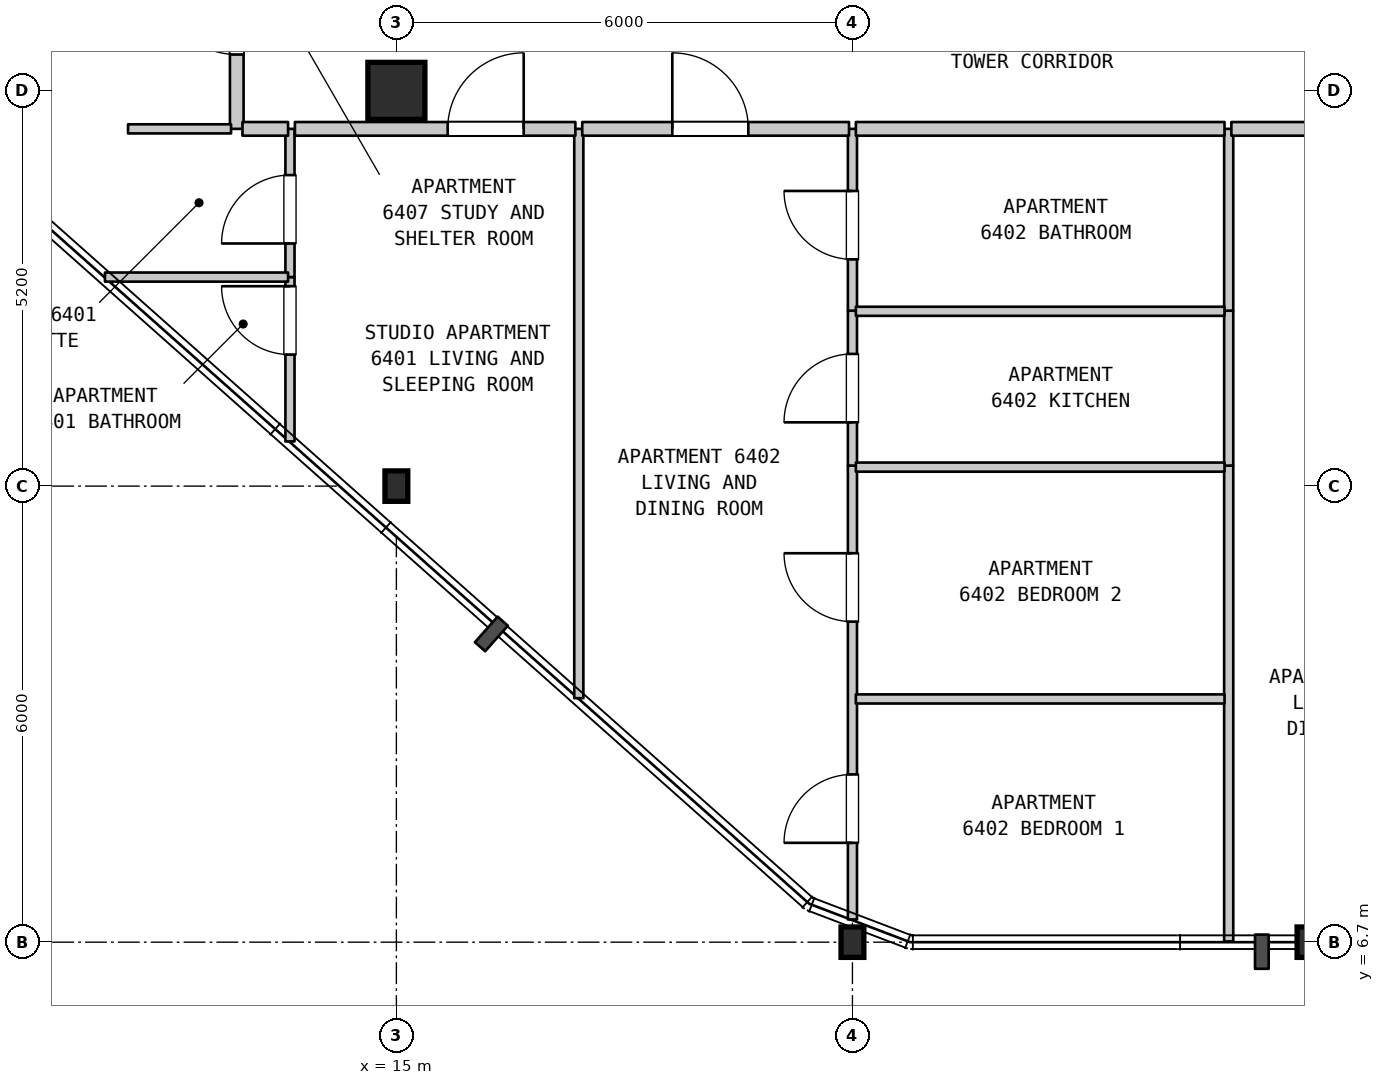
"""IFC4 building model, lengths in metres.
Left out: names, types, materials, properties, quantities, classifications, styles, units other than length and angle.
Written with IfcOpenShell. Run it as: python <this file> out.ifc"""

import sys

from ifc_helpers import new_model, si_unit, direction, frame, frame_2d, origin, origin_2d, place, context, subcontext, project, spatial, rectangle, i_section, extrude, element, fill, save


model = new_model("IFC4")
c1 = context("Model", 3, precision=1e-05, world=origin(), true_north=direction((0.0, 1.0)))
c2 = subcontext(c1, "Body", "Model", "MODEL_VIEW")
j1 = project(units=[si_unit("LENGTHUNIT", "METRE"), si_unit("PLANEANGLEUNIT", "RADIAN")], contexts=[c1])
p1 = place(None, origin())
s1 = spatial("IfcSite", under=j1, at=p1, CompositionType="ELEMENT")
p2 = place(p1, origin())
s2 = spatial("IfcBuilding", under=s1, at=p2, CompositionType="ELEMENT")
p3 = place(p2, frame((0.0, 0.0, 258.4)))
s3 = spatial("IfcBuildingStorey", under=s2, at=p3, CompositionType="ELEMENT", Elevation=258.4)
p4 = place(p3, frame((15.0, 12.7, 0.0), z_axis=(0.0, 0.0, 1.0), x_axis=(1.0, 0.0, 0.0)))
e1 = element("IfcColumn", 1, at=p4, inside=s3, PredefinedType="COLUMN", context=c2, shape_type="SweptSolid", body=[
    extrude(i_section(OverallWidth=0.3, OverallDepth=0.4, WebThickness=0.013, FlangeThickness=0.024, FilletRadius=0.027, at=origin_2d()), origin(), (0.0, 0.0, 1.0), 3.7),
])
p5 = place(p3, frame((15.0, 17.9, 0.0), z_axis=(0.0, 0.0, 1.0), x_axis=(1.0, 0.0, 0.0)))
e2 = element("IfcColumn", 2, at=p5, inside=s3, PredefinedType="COLUMN", context=c2, shape_type="SweptSolid", body=[
    extrude(rectangle(XDim=0.75, YDim=0.75, at=origin_2d()), origin(), (0.0, 0.0, 1.0), 3.7),
])
for number, where, z_axis, x_axis in (
    (3, (21.0, 6.7, 0.0), (0.0, 0.0, 1.0), (1.0, 0.0, 0.0)),
    (4, (27.0, 6.7, 0.0), (0.0, 0.0, 1.0), (1.0, 0.0, 0.0)),
):
    element("IfcColumn", number, at=place(p3, frame(where, z_axis=z_axis, x_axis=x_axis)), inside=s3, PredefinedType="COLUMN", context=c2, shape_type="SweptSolid", body=[
        extrude(i_section(OverallWidth=0.3, OverallDepth=0.4, WebThickness=0.013, FlangeThickness=0.024, FilletRadius=0.027, at=origin_2d()), origin(), (0.0, 0.0, 1.0), 3.7),
    ])
p6 = place(p3, frame((12.9, 17.4, 0.0), z_axis=(0.0, 0.0, 1.0), x_axis=(0.0, 1.0, 0.0)))
e5 = element("IfcWall", 5, at=p6, inside=s3, PredefinedType="STANDARD", context=c2, shape_type="SweptSolid", body=[
    extrude(rectangle(XDim=3.1, YDim=0.18, at=frame_2d((1.55, 0.0))), origin(), (0.0, 0.0, 1.0), 3.39),
])
p7 = place(p6, frame((0.978, 0.0, 0.0)))
e6 = element("IfcOpeningElement", 6, at=p7, cuts=e5, PredefinedType="OPENING", context=c2, shape_type="SweptSolid", body=[
    extrude(rectangle(XDim=1.0, YDim=2.15, at=frame_2d((0.5, 1.075))), frame((0.0, 0.1, 0.0), z_axis=(0.0, -1.0, 0.0), x_axis=(1.0, 0.0, 0.0)), (0.0, 0.0, 1.0), 0.2),
])
p8 = place(p3, frame((13.6, 13.288, 0.0), z_axis=(0.0, 0.0, 1.0), x_axis=(0.0, 1.0, 0.0)))
e7 = element("IfcWall", 7, at=p8, inside=s3, PredefinedType="PARTITIONING", context=c2, shape_type="SweptSolid", body=[
    extrude(rectangle(XDim=2.162, YDim=0.12, at=frame_2d((1.081, 0.0))), origin(), (0.0, 0.0, 1.0), 3.39),
])
p9 = place(p8, frame((1.142, 0.0, 0.0)))
e8 = element("IfcOpeningElement", 8, at=p9, cuts=e7, PredefinedType="OPENING", context=c2, shape_type="SweptSolid", body=[
    extrude(rectangle(XDim=0.9, YDim=2.1, at=frame_2d((0.45, 1.05))), frame((0.0, 0.07, 0.0), z_axis=(0.0, -1.0, 0.0), x_axis=(1.0, 0.0, 0.0)), (0.0, 0.0, 1.0), 0.14),
])
p10 = place(p3, frame((13.6, 15.45, 0.0), z_axis=(0.0, 0.0, 1.0), x_axis=(0.0, 1.0, 0.0)))
e9 = element("IfcWall", 9, at=p10, inside=s3, PredefinedType="PARTITIONING", context=c2, shape_type="SweptSolid", body=[
    extrude(rectangle(XDim=1.95, YDim=0.12, at=frame_2d((0.975, 0.0))), origin(), (0.0, 0.0, 1.0), 3.39),
])
p11 = place(p10, frame((0.442, 0.0, 0.0)))
e10 = element("IfcOpeningElement", 10, at=p11, cuts=e9, PredefinedType="OPENING", context=c2, shape_type="SweptSolid", body=[
    extrude(rectangle(XDim=0.9, YDim=2.15, at=frame_2d((0.45, 1.075))), frame((0.0, 0.07, 0.0), z_axis=(0.0, -1.0, 0.0), x_axis=(1.0, 0.0, 0.0)), (0.0, 0.0, 1.0), 0.14),
])
p12 = place(p3, frame((17.4, 9.91, 0.0), z_axis=(0.0, 0.0, 1.0), x_axis=(0.0, 1.0, 0.0)))
e11 = element("IfcWall", 11, at=p12, inside=s3, PredefinedType="PARTITIONING", context=c2, shape_type="SweptSolid", body=[
    extrude(rectangle(XDim=7.49, YDim=0.12, at=frame_2d((3.745, 0.0))), origin(), (0.0, 0.0, 1.0), 3.39),
])
p13 = place(p3, frame((21.0, 6.999, 0.0), z_axis=(0.0, 0.0, 1.0), x_axis=(0.0, 1.0, 0.0)))
e12 = element("IfcWall", 12, at=p13, inside=s3, PredefinedType="PARTITIONING", context=c2, shape_type="SweptSolid", body=[
    extrude(rectangle(XDim=5.971, YDim=0.12, at=frame_2d((2.985, 0.0))), origin(), (0.0, 0.0, 1.0), 3.39),
])
p14 = place(p13, frame((1.008, 0.0, 0.0)))
e13 = element("IfcOpeningElement", 13, at=p14, cuts=e12, PredefinedType="OPENING", context=c2, shape_type="SweptSolid", body=[
    extrude(rectangle(XDim=0.9, YDim=2.15, at=frame_2d((0.45, 1.075))), frame((0.0, 0.07, 0.0), z_axis=(0.0, -1.0, 0.0), x_axis=(1.0, 0.0, 0.0)), (0.0, 0.0, 1.0), 0.14),
])
p15 = place(p13, frame((3.918, 0.0, 0.0)))
e14 = element("IfcOpeningElement", 14, at=p15, cuts=e12, PredefinedType="OPENING", context=c2, shape_type="SweptSolid", body=[
    extrude(rectangle(XDim=0.9, YDim=2.15, at=frame_2d((0.45, 1.075))), frame((0.0, 0.07, 0.0), z_axis=(0.0, -1.0, 0.0), x_axis=(1.0, 0.0, 0.0)), (0.0, 0.0, 1.0), 0.14),
])
p16 = place(p3, frame((21.0, 12.97, 0.0), z_axis=(0.0, 0.0, 1.0), x_axis=(0.0, 1.0, 0.0)))
e15 = element("IfcWall", 15, at=p16, inside=s3, PredefinedType="PARTITIONING", context=c2, shape_type="SweptSolid", body=[
    extrude(rectangle(XDim=2.038, YDim=0.12, at=frame_2d((1.019, 0.0))), origin(), (0.0, 0.0, 1.0), 3.39),
])
p17 = place(p16, frame((0.569, 0.0, 0.0)))
e16 = element("IfcOpeningElement", 16, at=p17, cuts=e15, PredefinedType="OPENING", context=c2, shape_type="SweptSolid", body=[
    extrude(rectangle(XDim=0.9, YDim=2.15, at=frame_2d((0.45, 1.075))), frame((0.0, 0.07, 0.0), z_axis=(0.0, -1.0, 0.0), x_axis=(1.0, 0.0, 0.0)), (0.0, 0.0, 1.0), 0.14),
])
p18 = place(p3, frame((21.0, 15.008, 0.0), z_axis=(0.0, 0.0, 1.0), x_axis=(0.0, 1.0, 0.0)))
e17 = element("IfcWall", 17, at=p18, inside=s3, PredefinedType="PARTITIONING", context=c2, shape_type="SweptSolid", body=[
    extrude(rectangle(XDim=2.392, YDim=0.12, at=frame_2d((1.196, 0.0))), origin(), (0.0, 0.0, 1.0), 3.39),
])
p19 = place(p18, frame((0.675, 0.0, 0.0)))
e18 = element("IfcOpeningElement", 18, at=p19, cuts=e17, PredefinedType="OPENING", context=c2, shape_type="SweptSolid", body=[
    extrude(rectangle(XDim=0.9, YDim=2.1, at=frame_2d((0.45, 1.05))), frame((0.0, 0.07, 0.0), z_axis=(0.0, -1.0, 0.0), x_axis=(1.0, 0.0, 0.0)), (0.0, 0.0, 1.0), 0.14),
])
p20 = place(p3, frame((25.95, 6.71, 0.0), z_axis=(0.0, 0.0, 1.0), x_axis=(0.0, 1.0, 0.0)))
e19 = element("IfcWall", 19, at=p20, inside=s3, PredefinedType="PARTITIONING", context=c2, shape_type="SweptSolid", body=[
    extrude(rectangle(XDim=6.26, YDim=0.12, at=frame_2d((3.13, 0.0))), origin(), (0.0, 0.0, 1.0), 3.39),
])
p21 = place(p3, frame((25.95, 12.97, 0.0), z_axis=(0.0, 0.0, 1.0), x_axis=(0.0, 1.0, 0.0)))
e20 = element("IfcWall", 20, at=p21, inside=s3, PredefinedType="PARTITIONING", context=c2, shape_type="SweptSolid", body=[
    extrude(rectangle(XDim=2.038, YDim=0.12, at=frame_2d((1.019, 0.0))), origin(), (0.0, 0.0, 1.0), 3.39),
])
p22 = place(p3, frame((25.95, 15.008, 0.0), z_axis=(0.0, 0.0, 1.0), x_axis=(0.0, 1.0, 0.0)))
e21 = element("IfcWall", 21, at=p22, inside=s3, PredefinedType="PARTITIONING", context=c2, shape_type="SweptSolid", body=[
    extrude(rectangle(XDim=2.392, YDim=0.12, at=frame_2d((1.196, 0.0))), origin(), (0.0, 0.0, 1.0), 3.39),
])
for number, where, z_axis, x_axis in (
    (22, (21.045, 9.9, 0.0), (0.0, 0.0, 1.0), (1.0, 0.0, 0.0)),
    (23, (21.045, 12.95, 0.0), (0.0, 0.0, 1.0), (1.0, 0.0, 0.0)),
    (24, (21.045, 15.0, 0.0), (0.0, 0.0, 1.0), (1.0, 0.0, 0.0)),
):
    element("IfcWall", number, at=place(p3, frame(where, z_axis=z_axis, x_axis=x_axis)), inside=s3, PredefinedType="PARTITIONING", context=c2, shape_type="SweptSolid", body=[
        extrude(rectangle(XDim=4.85, YDim=0.12, at=frame_2d((2.425, 0.0))), origin(), (0.0, 0.0, 1.0), 3.39),
    ])
p23 = place(p3, frame((11.166, 15.45, 0.0), z_axis=(0.0, 0.0, 1.0), x_axis=(1.0, 0.0, 0.0)))
e25 = element("IfcWall", 25, at=p23, inside=s3, PredefinedType="PARTITIONING", context=c2, shape_type="SweptSolid", body=[
    extrude(rectangle(XDim=2.409, YDim=0.12, at=frame_2d((1.205, 0.0))), origin(), (0.0, 0.0, 1.0), 3.39),
])
p24 = place(p3, frame((11.47, 17.4, 0.0), z_axis=(0.0, 0.0, 1.0), x_axis=(1.0, 0.0, 0.0)))
e26 = element("IfcWall", 26, at=p24, inside=s3, PredefinedType="PARTITIONING", context=c2, shape_type="SweptSolid", body=[
    extrude(rectangle(XDim=1.355, YDim=0.12, at=frame_2d((0.677, 0.0))), origin(), (0.0, 0.0, 1.0), 3.39),
])
p25 = place(p3, frame((12.975, 17.4, 0.0), z_axis=(0.0, 0.0, 1.0), x_axis=(1.0, 0.0, 0.0)))
e27 = element("IfcWall", 27, at=p25, inside=s3, PredefinedType="STANDARD", context=c2, shape_type="SweptSolid", body=[
    extrude(rectangle(XDim=0.6, YDim=0.18, at=frame_2d((0.3, 0.0))), origin(), (0.0, 0.0, 1.0), 3.39),
])
p26 = place(p3, frame((13.665, 17.4, 0.0), z_axis=(0.0, 0.0, 1.0), x_axis=(1.0, 0.0, 0.0)))
e28 = element("IfcWall", 28, at=p26, inside=s3, PredefinedType="STANDARD", context=c2, shape_type="SweptSolid", body=[
    extrude(rectangle(XDim=3.69, YDim=0.18, at=frame_2d((1.845, 0.0))), origin(), (0.0, 0.0, 1.0), 3.39),
])
p27 = place(p26, frame((2.01, 0.0, 0.0)))
e29 = element("IfcOpeningElement", 29, at=p27, cuts=e28, PredefinedType="OPENING", context=c2, shape_type="SweptSolid", body=[
    extrude(rectangle(XDim=1.0, YDim=2.15, at=frame_2d((0.5, 1.075))), frame((0.0, 0.1, 0.0), z_axis=(0.0, -1.0, 0.0), x_axis=(1.0, 0.0, 0.0)), (0.0, 0.0, 1.0), 0.2),
])
p28 = place(p3, frame((17.445, 17.4, 0.0), z_axis=(0.0, 0.0, 1.0), x_axis=(1.0, 0.0, 0.0)))
e30 = element("IfcWall", 30, at=p28, inside=s3, PredefinedType="STANDARD", context=c2, shape_type="SweptSolid", body=[
    extrude(rectangle(XDim=3.51, YDim=0.18, at=frame_2d((1.755, 0.0))), origin(), (0.0, 0.0, 1.0), 3.39),
])
p29 = place(p28, frame((1.185, 0.0, 0.0)))
e31 = element("IfcOpeningElement", 31, at=p29, cuts=e30, PredefinedType="OPENING", context=c2, shape_type="SweptSolid", body=[
    extrude(rectangle(XDim=1.0, YDim=2.15, at=frame_2d((0.5, 1.075))), frame((0.0, 0.1, 0.0), z_axis=(0.0, -1.0, 0.0), x_axis=(1.0, 0.0, 0.0)), (0.0, 0.0, 1.0), 0.2),
])
p30 = place(p3, frame((21.045, 17.4, 0.0), z_axis=(0.0, 0.0, 1.0), x_axis=(1.0, 0.0, 0.0)))
e32 = element("IfcWall", 32, at=p30, inside=s3, PredefinedType="STANDARD", context=c2, shape_type="SweptSolid", body=[
    extrude(rectangle(XDim=4.85, YDim=0.18, at=frame_2d((2.425, 0.0))), origin(), (0.0, 0.0, 1.0), 3.39),
])
p31 = place(p3, frame((25.985, 17.4, 0.0), z_axis=(0.0, 0.0, 1.0), x_axis=(1.0, 0.0, 0.0)))
e33 = element("IfcWall", 33, at=p31, inside=s3, PredefinedType="STANDARD", context=c2, shape_type="SweptSolid", body=[
    extrude(rectangle(XDim=3.51, YDim=0.18, at=frame_2d((1.755, 0.0))), origin(), (0.0, 0.0, 1.0), 3.39),
])
p32 = place(p31, frame((1.255, 0.0, 0.0)))
e34 = element("IfcOpeningElement", 34, at=p32, cuts=e33, PredefinedType="OPENING", context=c2, shape_type="SweptSolid", body=[
    extrude(rectangle(XDim=1.0, YDim=2.15, at=frame_2d((0.5, 1.075))), frame((0.0, 0.1, 0.0), z_axis=(0.0, -1.0, 0.0), x_axis=(1.0, 0.0, 0.0)), (0.0, 0.0, 1.0), 0.2),
])
p33 = place(p7, origin())
e35 = element("IfcDoor", 35, at=p33, inside=s3, OperationType="SINGLE_SWING_RIGHT", PredefinedType="DOOR", context=c2, shape_type="SweptSolid", body=[
    extrude(rectangle(XDim=1.0, YDim=2.15, at=frame_2d((0.5, 1.075))), frame((0.0, 0.025, 0.0), z_axis=(0.0, -1.0, 0.0), x_axis=(1.0, 0.0, 0.0)), (0.0, 0.0, 1.0), 0.05),
])
fill(e6, e35)
p34 = place(p9, origin())
e36 = element("IfcDoor", 36, at=p34, inside=s3, OperationType="SINGLE_SWING_RIGHT", PredefinedType="DOOR", context=c2, shape_type="SweptSolid", body=[
    extrude(rectangle(XDim=0.9, YDim=2.1, at=frame_2d((0.45, 1.05))), frame((0.0, 0.025, 0.0), z_axis=(0.0, -1.0, 0.0), x_axis=(1.0, 0.0, 0.0)), (0.0, 0.0, 1.0), 0.05),
])
fill(e8, e36)
p35 = place(p11, origin())
e37 = element("IfcDoor", 37, at=p35, inside=s3, OperationType="SINGLE_SWING_LEFT", PredefinedType="DOOR", context=c2, shape_type="SweptSolid", body=[
    extrude(rectangle(XDim=0.9, YDim=2.15, at=frame_2d((0.45, 1.075))), frame((0.0, 0.025, 0.0), z_axis=(0.0, -1.0, 0.0), x_axis=(1.0, 0.0, 0.0)), (0.0, 0.0, 1.0), 0.05),
])
fill(e10, e37)
p36 = place(p14, origin())
e38 = element("IfcDoor", 38, at=p36, inside=s3, OperationType="SINGLE_SWING_LEFT", PredefinedType="DOOR", context=c2, shape_type="SweptSolid", body=[
    extrude(rectangle(XDim=0.9, YDim=2.15, at=frame_2d((0.45, 1.075))), frame((0.0, 0.025, 0.0), z_axis=(0.0, -1.0, 0.0), x_axis=(1.0, 0.0, 0.0)), (0.0, 0.0, 1.0), 0.05),
])
fill(e13, e38)
p37 = place(p15, origin())
e39 = element("IfcDoor", 39, at=p37, inside=s3, OperationType="SINGLE_SWING_RIGHT", PredefinedType="DOOR", context=c2, shape_type="SweptSolid", body=[
    extrude(rectangle(XDim=0.9, YDim=2.15, at=frame_2d((0.45, 1.075))), frame((0.0, 0.025, 0.0), z_axis=(0.0, -1.0, 0.0), x_axis=(1.0, 0.0, 0.0)), (0.0, 0.0, 1.0), 0.05),
])
fill(e14, e39)
p38 = place(p17, origin())
e40 = element("IfcDoor", 40, at=p38, inside=s3, OperationType="SINGLE_SWING_LEFT", PredefinedType="DOOR", context=c2, shape_type="SweptSolid", body=[
    extrude(rectangle(XDim=0.9, YDim=2.15, at=frame_2d((0.45, 1.075))), frame((0.0, 0.025, 0.0), z_axis=(0.0, -1.0, 0.0), x_axis=(1.0, 0.0, 0.0)), (0.0, 0.0, 1.0), 0.05),
])
fill(e16, e40)
p39 = place(p19, origin())
e41 = element("IfcDoor", 41, at=p39, inside=s3, OperationType="SINGLE_SWING_RIGHT", PredefinedType="DOOR", context=c2, shape_type="SweptSolid", body=[
    extrude(rectangle(XDim=0.9, YDim=2.1, at=frame_2d((0.45, 1.05))), frame((0.0, 0.025, 0.0), z_axis=(0.0, -1.0, 0.0), x_axis=(1.0, 0.0, 0.0)), (0.0, 0.0, 1.0), 0.05),
])
fill(e18, e41)
p40 = place(p27, origin())
e42 = element("IfcDoor", 42, at=p40, inside=s3, OperationType="SINGLE_SWING_RIGHT", PredefinedType="DOOR", context=c2, shape_type="SweptSolid", body=[
    extrude(rectangle(XDim=1.0, YDim=2.15, at=frame_2d((0.5, 1.075))), frame((0.0, 0.025, 0.0), z_axis=(0.0, -1.0, 0.0), x_axis=(1.0, 0.0, 0.0)), (0.0, 0.0, 1.0), 0.05),
])
fill(e29, e42)
p41 = place(p29, origin())
e43 = element("IfcDoor", 43, at=p41, inside=s3, OperationType="SINGLE_SWING_LEFT", PredefinedType="DOOR", context=c2, shape_type="SweptSolid", body=[
    extrude(rectangle(XDim=1.0, YDim=2.15, at=frame_2d((0.5, 1.075))), frame((0.0, 0.025, 0.0), z_axis=(0.0, -1.0, 0.0), x_axis=(1.0, 0.0, 0.0)), (0.0, 0.0, 1.0), 0.05),
])
fill(e31, e43)
save(model, sys.argv[1])
